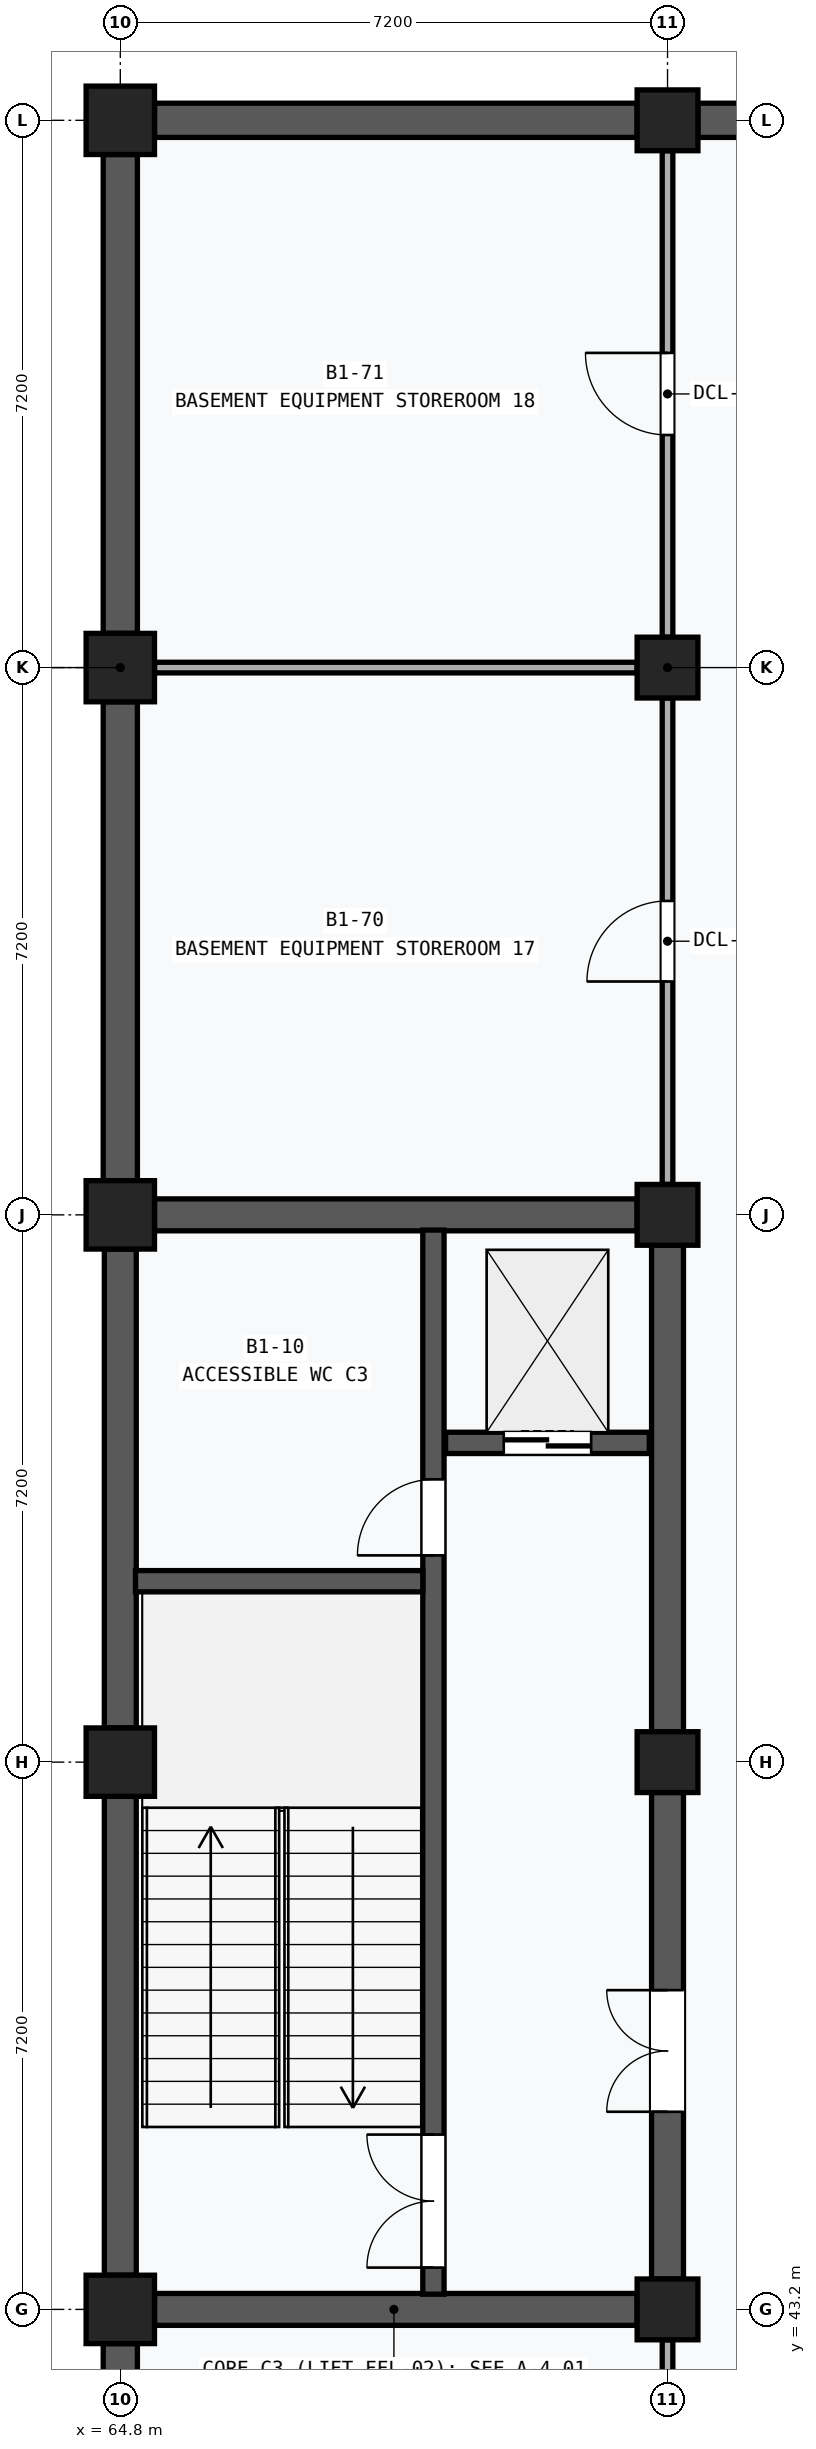
"""IFC4 building model, lengths in metres.
Left out: names, types, materials, properties, quantities, classifications, styles, units other than length and angle.
Written with IfcOpenShell. Run it as: python <this file> out.ifc"""

import sys

from ifc_helpers import new_model, si_unit, direction, frame, frame_2d, origin, origin_2d, place, context, subcontext, project, spatial, rectangle, extrude, element, fill, save


model = new_model("IFC4")
c1 = context("Model", 3, precision=1e-05, world=origin(), true_north=direction((0.0, 1.0)))
c2 = subcontext(c1, "Body", "Model", "MODEL_VIEW")
j1 = project(units=[si_unit("LENGTHUNIT", "METRE"), si_unit("PLANEANGLEUNIT", "RADIAN")], contexts=[c1])
p1 = place(None, origin())
s1 = spatial("IfcSite", under=j1, at=p1, CompositionType="ELEMENT")
p2 = place(p1, origin())
s2 = spatial("IfcBuilding", under=s1, at=p2, CompositionType="ELEMENT")
p3 = place(p2, frame((0.0, 0.0, -4.5)))
s3 = spatial("IfcBuildingStorey", under=s2, at=p3, CompositionType="ELEMENT", Elevation=-4.5)
for number, where, z_axis, x_axis in (
    (1, (64.8, 43.2, 0.0), (0.0, 0.0, 1.0), (1.0, 0.0, 0.0)),
    (2, (64.8, 50.4, 0.0), (0.0, 0.0, 1.0), (1.0, 0.0, 0.0)),
    (3, (64.8, 57.6, 0.0), (0.0, 0.0, 1.0), (1.0, 0.0, 0.0)),
    (4, (64.8, 64.8, 0.0), (0.0, 0.0, 1.0), (1.0, 0.0, 0.0)),
    (5, (64.8, 72.0, 0.0), (0.0, 0.0, 1.0), (1.0, 0.0, 0.0)),
):
    element("IfcColumn", number, at=place(p3, frame(where, z_axis=z_axis, x_axis=x_axis)), inside=s3, PredefinedType="COLUMN", context=c2, shape_type="SweptSolid", body=[
        extrude(rectangle(XDim=0.9, YDim=0.9, at=origin_2d()), origin(), (0.0, 0.0, 1.0), 4.5),
    ])
for number, where, z_axis, x_axis in (
    (6, (72.0, 43.2, 0.0), (0.0, 0.0, 1.0), (1.0, 0.0, 0.0)),
    (7, (72.0, 50.4, 0.0), (0.0, 0.0, 1.0), (1.0, 0.0, 0.0)),
    (8, (72.0, 57.6, 0.0), (0.0, 0.0, 1.0), (1.0, 0.0, 0.0)),
    (9, (72.0, 64.8, 0.0), (0.0, 0.0, 1.0), (1.0, 0.0, 0.0)),
    (10, (72.0, 72.0, 0.0), (0.0, 0.0, 1.0), (1.0, 0.0, 0.0)),
):
    element("IfcColumn", number, at=place(p3, frame(where, z_axis=z_axis, x_axis=x_axis)), inside=s3, PredefinedType="COLUMN", context=c2, shape_type="SweptSolid", body=[
        extrude(rectangle(XDim=0.8, YDim=0.8, at=origin_2d()), origin(), (0.0, 0.0, 1.0), 4.5),
    ])
for number, where, z_axis, x_axis in (
    (11, (64.8, 36.45, 0.0), (0.0, 0.0, 1.0), (0.0, 1.0, 0.0)),
    (12, (64.8, 58.05, 0.0), (0.0, 0.0, 1.0), (0.0, 1.0, 0.0)),
):
    element("IfcWall", number, at=place(p3, frame(where, z_axis=z_axis, x_axis=x_axis)), inside=s3, PredefinedType="SOLIDWALL", context=c2, shape_type="SweptSolid", body=[
        extrude(rectangle(XDim=6.3, YDim=0.45, at=frame_2d((3.15, 0.0))), origin(), (0.0, 0.0, 1.0), 3.57),
    ])
p4 = place(p3, frame((65.25, 72.0, 0.0), z_axis=(0.0, 0.0, 1.0), x_axis=(1.0, 0.0, 0.0)))
e13 = element("IfcWall", 13, at=p4, inside=s3, PredefinedType="SOLIDWALL", context=c2, shape_type="SweptSolid", body=[
    extrude(rectangle(XDim=6.35, YDim=0.45, at=frame_2d((3.175, 0.0))), origin(), (0.0, 0.0, 1.0), 3.57),
])
p5 = place(p3, frame((64.8, 65.25, 0.0), z_axis=(0.0, 0.0, 1.0), x_axis=(0.0, 1.0, 0.0)))
e14 = element("IfcWall", 14, at=p5, inside=s3, PredefinedType="SOLIDWALL", context=c2, shape_type="SweptSolid", body=[
    extrude(rectangle(XDim=6.3, YDim=0.45, at=frame_2d((3.15, 0.0))), origin(), (0.0, 0.0, 1.0), 3.57),
])
p6 = place(p3, frame((72.4, 72.0, 0.0), z_axis=(0.0, 0.0, 1.0), x_axis=(1.0, 0.0, 0.0)))
e15 = element("IfcWall", 15, at=p6, inside=s3, PredefinedType="SOLIDWALL", context=c2, shape_type="SweptSolid", body=[
    extrude(rectangle(XDim=6.4, YDim=0.45, at=frame_2d((3.2, 0.0))), origin(), (0.0, 0.0, 1.0), 3.57),
])
p7 = place(p3, frame((64.8, 43.65, 0.0), z_axis=(0.0, 0.0, 1.0), x_axis=(0.0, 1.0, 0.0)))
e16 = element("IfcWall", 16, at=p7, inside=s3, PredefinedType="SHEAR", context=c2, shape_type="SweptSolid", body=[
    extrude(rectangle(XDim=6.3, YDim=0.42, at=frame_2d((3.15, 0.0))), origin(), (0.0, 0.0, 1.0), 3.57),
])
p8 = place(p3, frame((64.8, 50.85, 0.0), z_axis=(0.0, 0.0, 1.0), x_axis=(0.0, 1.0, 0.0)))
e17 = element("IfcWall", 17, at=p8, inside=s3, PredefinedType="SHEAR", context=c2, shape_type="SweptSolid", body=[
    extrude(rectangle(XDim=6.3, YDim=0.42, at=frame_2d((3.15, 0.0))), origin(), (0.0, 0.0, 1.0), 3.57),
])
p9 = place(p3, frame((72.0, 43.6, 0.0), z_axis=(0.0, 0.0, 1.0), x_axis=(0.0, 1.0, 0.0)))
e18 = element("IfcWall", 18, at=p9, inside=s3, PredefinedType="SHEAR", context=c2, shape_type="SweptSolid", body=[
    extrude(rectangle(XDim=6.4, YDim=0.42, at=frame_2d((3.2, 0.0))), origin(), (0.0, 0.0, 1.0), 3.3),
])
p10 = place(p9, frame((2.2, 0.0, 0.0)))
e19 = element("IfcOpeningElement", 19, at=p10, cuts=e18, PredefinedType="OPENING", context=c2, shape_type="SweptSolid", body=[
    extrude(rectangle(XDim=1.6, YDim=2.2, at=frame_2d((0.8, 1.1))), frame((0.0, 0.222, 0.0), z_axis=(0.0, -1.0, 0.0), x_axis=(1.0, 0.0, 0.0)), (0.0, 0.0, 1.0), 0.444),
])
p11 = place(p3, frame((72.0, 50.8, 0.0), z_axis=(0.0, 0.0, 1.0), x_axis=(0.0, 1.0, 0.0)))
e20 = element("IfcWall", 20, at=p11, inside=s3, PredefinedType="SHEAR", context=c2, shape_type="SweptSolid", body=[
    extrude(rectangle(XDim=6.4, YDim=0.42, at=frame_2d((3.2, 0.0))), origin(), (0.0, 0.0, 1.0), 3.3),
])
for number, where, z_axis, x_axis in (
    (21, (65.25, 43.2, 0.0), (0.0, 0.0, 1.0), (1.0, 0.0, 0.0)),
    (22, (65.25, 57.6, 0.0), (0.0, 0.0, 1.0), (1.0, 0.0, 0.0)),
):
    element("IfcWall", number, at=place(p3, frame(where, z_axis=z_axis, x_axis=x_axis)), inside=s3, PredefinedType="SHEAR", context=c2, shape_type="SweptSolid", body=[
        extrude(rectangle(XDim=6.35, YDim=0.42, at=frame_2d((3.175, 0.0))), origin(), (0.0, 0.0, 1.0), 3.3),
    ])
p12 = place(p3, frame((68.92, 43.4, 0.0), z_axis=(0.0, 0.0, 1.0), x_axis=(0.0, 1.0, 0.0)))
e23 = element("IfcWall", 23, at=p12, inside=s3, PredefinedType="SHEAR", context=c2, shape_type="SweptSolid", body=[
    extrude(rectangle(XDim=14.0, YDim=0.28, at=frame_2d((7.0, 0.0))), origin(), (0.0, 0.0, 1.0), 4.2),
])
p13 = place(p12, frame((0.35, 0.0, 0.0)))
e24 = element("IfcOpeningElement", 24, at=p13, cuts=e23, PredefinedType="OPENING", context=c2, shape_type="SweptSolid", body=[
    extrude(rectangle(XDim=1.75, YDim=2.15, at=frame_2d((0.875, 1.075))), frame((0.0, 0.152, 0.0), z_axis=(0.0, -1.0, 0.0), x_axis=(1.0, 0.0, 0.0)), (0.0, 0.0, 1.0), 0.304),
])
p14 = place(p12, frame((9.72, 0.0, 0.0)))
e25 = element("IfcOpeningElement", 25, at=p14, cuts=e23, PredefinedType="OPENING", context=c2, shape_type="SweptSolid", body=[
    extrude(rectangle(XDim=1.0, YDim=2.15, at=frame_2d((0.5, 1.075))), frame((0.0, 0.152, 0.0), z_axis=(0.0, -1.0, 0.0), x_axis=(1.0, 0.0, 0.0)), (0.0, 0.0, 1.0), 0.304),
])
p15 = place(p3, frame((65.0, 52.78, 0.0), z_axis=(0.0, 0.0, 1.0), x_axis=(1.0, 0.0, 0.0)))
e26 = element("IfcWall", 26, at=p15, inside=s3, PredefinedType="SHEAR", context=c2, shape_type="SweptSolid", body=[
    extrude(rectangle(XDim=3.78, YDim=0.28, at=frame_2d((1.89, 0.0))), origin(), (0.0, 0.0, 1.0), 4.2),
])
p16 = place(p3, frame((69.08, 54.6, 0.0), z_axis=(0.0, 0.0, 1.0), x_axis=(1.0, 0.0, 0.0)))
e27 = element("IfcWall", 27, at=p16, inside=s3, PredefinedType="SHEAR", context=c2, shape_type="SweptSolid", body=[
    extrude(rectangle(XDim=2.68, YDim=0.28, at=frame_2d((1.34, 0.0))), origin(), (0.0, 0.0, 1.0), 4.2),
])
p17 = place(p16, frame((0.765, 0.0, 0.0)))
e28 = element("IfcOpeningElement", 28, at=p17, cuts=e27, PredefinedType="OPENING", context=c2, shape_type="SweptSolid", body=[
    extrude(rectangle(XDim=1.15, YDim=2.2, at=frame_2d((0.575, 1.1))), frame((0.0, 0.152, 0.0), z_axis=(0.0, -1.0, 0.0), x_axis=(1.0, 0.0, 0.0)), (0.0, 0.0, 1.0), 0.304),
])
p18 = place(p3, frame((72.0, 36.4, 0.0), z_axis=(0.0, 0.0, 1.0), x_axis=(0.0, 1.0, 0.0)))
e29 = element("IfcWall", 29, at=p18, inside=s3, PredefinedType="PARTITIONING", context=c2, shape_type="SweptSolid", body=[
    extrude(rectangle(XDim=6.4, YDim=0.14, at=frame_2d((3.2, 0.0))), origin(), (0.0, 0.0, 1.0), 3.3),
])
p19 = place(p18, frame((2.68, 0.0, 0.0)))
e30 = element("IfcOpeningElement", 30, at=p19, cuts=e29, PredefinedType="OPENING", context=c2, shape_type="SweptSolid", body=[
    extrude(rectangle(XDim=1.04, YDim=2.14, at=frame_2d((0.52, 1.07))), frame((0.0, 0.082, 0.0), z_axis=(0.0, -1.0, 0.0), x_axis=(1.0, 0.0, 0.0)), (0.0, 0.0, 1.0), 0.164),
])
p20 = place(p3, frame((65.25, 64.8, 0.0), z_axis=(0.0, 0.0, 1.0), x_axis=(1.0, 0.0, 0.0)))
e31 = element("IfcWall", 31, at=p20, inside=s3, PredefinedType="PARTITIONING", context=c2, shape_type="SweptSolid", body=[
    extrude(rectangle(XDim=6.35, YDim=0.14, at=frame_2d((3.175, 0.0))), origin(), (0.0, 0.0, 1.0), 3.3),
])
p21 = place(p3, frame((72.0, 58.0, 0.0), z_axis=(0.0, 0.0, 1.0), x_axis=(0.0, 1.0, 0.0)))
e32 = element("IfcWall", 32, at=p21, inside=s3, PredefinedType="PARTITIONING", context=c2, shape_type="SweptSolid", body=[
    extrude(rectangle(XDim=6.4, YDim=0.14, at=frame_2d((3.2, 0.0))), origin(), (0.0, 0.0, 1.0), 3.3),
])
p22 = place(p21, frame((2.67, 0.0, 0.0)))
e33 = element("IfcOpeningElement", 33, at=p22, cuts=e32, PredefinedType="OPENING", context=c2, shape_type="SweptSolid", body=[
    extrude(rectangle(XDim=1.06, YDim=2.16, at=frame_2d((0.53, 1.08))), frame((0.0, 0.082, 0.0), z_axis=(0.0, -1.0, 0.0), x_axis=(1.0, 0.0, 0.0)), (0.0, 0.0, 1.0), 0.164),
])
p23 = place(p3, frame((72.0, 65.2, 0.0), z_axis=(0.0, 0.0, 1.0), x_axis=(0.0, 1.0, 0.0)))
e34 = element("IfcWall", 34, at=p23, inside=s3, PredefinedType="PARTITIONING", context=c2, shape_type="SweptSolid", body=[
    extrude(rectangle(XDim=6.4, YDim=0.14, at=frame_2d((3.2, 0.0))), origin(), (0.0, 0.0, 1.0), 3.3),
])
p24 = place(p23, frame((2.66, 0.0, 0.0)))
e35 = element("IfcOpeningElement", 35, at=p24, cuts=e34, PredefinedType="OPENING", context=c2, shape_type="SweptSolid", body=[
    extrude(rectangle(XDim=1.08, YDim=2.18, at=frame_2d((0.54, 1.09))), frame((0.0, 0.082, 0.0), z_axis=(0.0, -1.0, 0.0), x_axis=(1.0, 0.0, 0.0)), (0.0, 0.0, 1.0), 0.164),
])
p25 = place(p10, origin())
e36 = element("IfcDoor", 36, at=p25, inside=s3, OperationType="DOUBLE_DOOR_SINGLE_SWING", PredefinedType="DOOR", context=c2, shape_type="SweptSolid", body=[
    extrude(rectangle(XDim=1.6, YDim=2.2, at=frame_2d((0.8, 1.1))), frame((0.0, 0.025, 0.0), z_axis=(0.0, -1.0, 0.0), x_axis=(1.0, 0.0, 0.0)), (0.0, 0.0, 1.0), 0.05),
])
fill(e19, e36)
p26 = place(p13, origin())
e37 = element("IfcDoor", 37, at=p26, inside=s3, OperationType="DOUBLE_DOOR_SINGLE_SWING", PredefinedType="DOOR", context=c2, shape_type="SweptSolid", body=[
    extrude(rectangle(XDim=1.75, YDim=2.15, at=frame_2d((0.875, 1.075))), frame((0.0, 0.025, 0.0), z_axis=(0.0, -1.0, 0.0), x_axis=(1.0, 0.0, 0.0)), (0.0, 0.0, 1.0), 0.05),
])
fill(e24, e37)
p27 = place(p14, origin())
e38 = element("IfcDoor", 38, at=p27, inside=s3, OperationType="SINGLE_SWING_LEFT", PredefinedType="DOOR", context=c2, shape_type="SweptSolid", body=[
    extrude(rectangle(XDim=1.0, YDim=2.15, at=frame_2d((0.5, 1.075))), frame((0.0, 0.025, 0.0), z_axis=(0.0, -1.0, 0.0), x_axis=(1.0, 0.0, 0.0)), (0.0, 0.0, 1.0), 0.05),
])
fill(e25, e38)
p28 = place(p17, frame((1.15, 0.0, 0.0), z_axis=(0.0, 0.0, 1.0), x_axis=(-1.0, 0.0, 0.0)))
e39 = element("IfcDoor", 39, at=p28, inside=s3, OperationType="DOUBLE_DOOR_SLIDING", PredefinedType="DOOR", context=c2, shape_type="SweptSolid", body=[
    extrude(rectangle(XDim=1.15, YDim=2.2, at=frame_2d((0.575, 1.1))), frame((0.0, 0.025, 0.0), z_axis=(0.0, -1.0, 0.0), x_axis=(1.0, 0.0, 0.0)), (0.0, 0.0, 1.0), 0.05),
])
fill(e28, e39)
p29 = place(p22, origin())
e40 = element("IfcDoor", 40, at=p29, inside=s3, OperationType="SINGLE_SWING_LEFT", PredefinedType="DOOR", context=c2, shape_type="SweptSolid", body=[
    extrude(rectangle(XDim=1.06, YDim=2.16, at=frame_2d((0.53, 1.08))), frame((0.0, 0.025, 0.0), z_axis=(0.0, -1.0, 0.0), x_axis=(1.0, 0.0, 0.0)), (0.0, 0.0, 1.0), 0.05),
])
fill(e33, e40)
p30 = place(p24, origin())
e41 = element("IfcDoor", 41, at=p30, inside=s3, OperationType="SINGLE_SWING_RIGHT", PredefinedType="DOOR", context=c2, shape_type="SweptSolid", body=[
    extrude(rectangle(XDim=1.08, YDim=2.18, at=frame_2d((0.54, 1.09))), frame((0.0, 0.025, 0.0), z_axis=(0.0, -1.0, 0.0), x_axis=(1.0, 0.0, 0.0)), (0.0, 0.0, 1.0), 0.05),
])
fill(e35, e41)
save(model, sys.argv[1])
